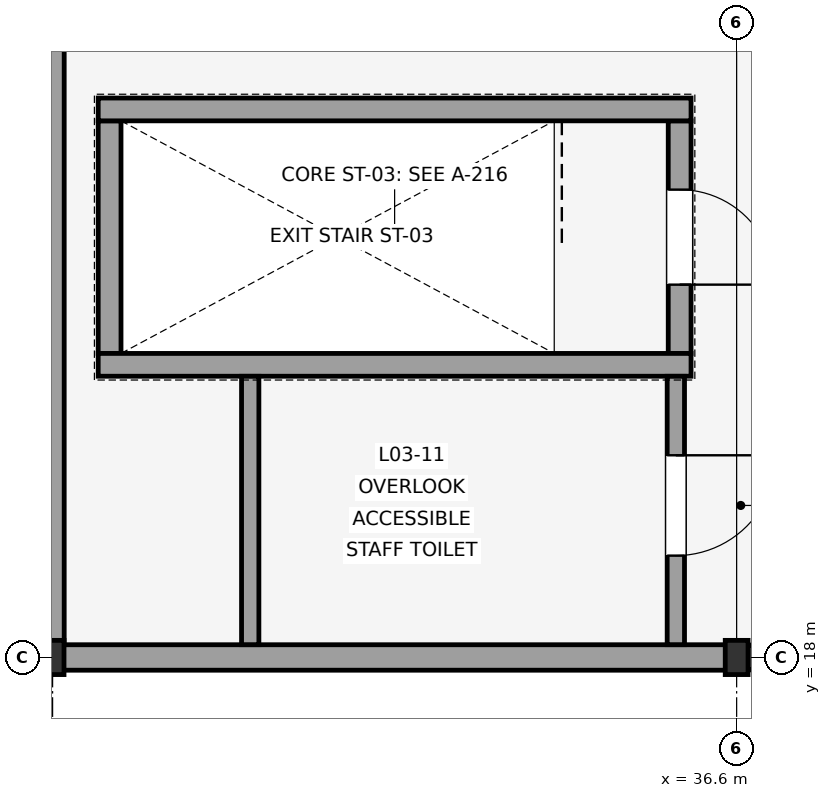
"""IFC4 building model, lengths in metres.
Left out: names, types, materials, properties, quantities, classifications, styles, units other than length and angle.
Written with IfcOpenShell. Run it as: python <this file> out.ifc"""

import sys

from ifc_helpers import new_model, si_unit, direction, frame, frame_2d, origin, origin_2d, place, context, subcontext, project, spatial, rectangle, i_section, extrude, element, fill, save


model = new_model("IFC4")
c1 = context("Model", 3, precision=1e-05, world=origin(), true_north=direction((0.0, 1.0)))
c2 = subcontext(c1, "Body", "Model", "MODEL_VIEW")
j1 = project(units=[si_unit("LENGTHUNIT", "METRE"), si_unit("PLANEANGLEUNIT", "RADIAN")], contexts=[c1])
p1 = place(None, origin())
s1 = spatial("IfcSite", under=j1, at=p1, CompositionType="ELEMENT")
p2 = place(p1, origin())
s2 = spatial("IfcBuilding", under=s1, at=p2, CompositionType="ELEMENT")
p3 = place(p2, frame((0.0, 0.0, 13.8)))
s3 = spatial("IfcBuildingStorey", under=s2, at=p3, CompositionType="ELEMENT", Elevation=13.8)
for number, where, z_axis, x_axis in (
    (1, (27.6, 18.0, 0.0), (0.0, 0.0, 1.0), (1.0, 0.0, 0.0)),
    (2, (36.6, 18.0, 0.0), (0.0, 0.0, 1.0), (1.0, 0.0, 0.0)),
):
    element("IfcColumn", number, at=place(p3, frame(where, z_axis=z_axis, x_axis=x_axis)), inside=s3, PredefinedType="COLUMN", context=c2, shape_type="SweptSolid", body=[
        extrude(i_section(OverallWidth=0.3, OverallDepth=0.45, WebThickness=0.014, FlangeThickness=0.026, FilletRadius=0.027, at=origin_2d()), origin(), (0.0, 0.0, 1.0), 4.5),
    ])
p4 = place(p3, frame((27.45, 18.0, 0.0), z_axis=(0.0, 0.0, 1.0), x_axis=(1.0, 0.0, 0.0)))
e3 = element("IfcWall", 3, at=p4, inside=s3, PredefinedType="SOLIDWALL", context=c2, shape_type="SweptSolid", body=[
    extrude(rectangle(XDim=9.3, YDim=0.335, at=frame_2d((4.65, 0.0))), origin(), (0.0, 0.0, 1.0), 2.55),
])
p5 = place(p3, frame((36.751, 18.0, 0.0), z_axis=(0.0, 0.0, 1.0), x_axis=(1.0, 0.0, 0.0)))
e4 = element("IfcWall", 4, at=p5, inside=s3, PredefinedType="SOLIDWALL", context=c2, shape_type="SweptSolid", body=[
    extrude(rectangle(XDim=8.999, YDim=0.32, at=frame_2d((4.5, 0.0))), origin(), (0.0, 0.0, 1.0), 2.55),
])
p6 = place(p3, frame((27.6, 26.0, 0.0), z_axis=(0.0, 0.0, 1.0), x_axis=(0.0, -1.0, 0.0)))
e5 = element("IfcWall", 5, at=p6, inside=s3, PredefinedType="SOLIDWALL", context=c2, shape_type="SweptSolid", body=[
    extrude(rectangle(XDim=7.832, YDim=0.305, at=frame_2d((3.916, 0.0))), origin(), (0.0, 0.0, 1.0), 2.55),
])
p7 = place(p3, frame((35.85, 25.06, 0.0), z_axis=(0.0, 0.0, 1.0), x_axis=(0.0, -1.0, 0.0)))
e6 = element("IfcWall", 6, at=p7, inside=s3, PredefinedType="SHEAR", context=c2, shape_type="SweptSolid", body=[
    extrude(rectangle(XDim=3.06, YDim=0.3, at=frame_2d((1.53, 0.0))), origin(), (0.0, 0.0, 1.0), 4.5),
])
p8 = place(p7, frame((0.905, 0.0, 0.0)))
e7 = element("IfcOpeningElement", 7, at=p8, cuts=e6, PredefinedType="OPENING", context=c2, shape_type="SweptSolid", body=[
    extrude(rectangle(XDim=1.25, YDim=2.15, at=frame_2d((0.625, 1.075))), frame((0.0, 0.16, 0.0), z_axis=(0.0, -1.0, 0.0), x_axis=(1.0, 0.0, 0.0)), (0.0, 0.0, 1.0), 0.32),
])
p9 = place(p3, frame((28.35, 25.06, 0.0), z_axis=(0.0, 0.0, 1.0), x_axis=(0.0, -1.0, 0.0)))
e8 = element("IfcWall", 8, at=p9, inside=s3, PredefinedType="SHEAR", context=c2, shape_type="SweptSolid", body=[
    extrude(rectangle(XDim=3.06, YDim=0.3, at=frame_2d((1.53, 0.0))), origin(), (0.0, 0.0, 1.0), 4.5),
])
for number, where, z_axis, x_axis in (
    (9, (36.0, 25.21, 0.0), (0.0, 0.0, 1.0), (-1.0, 0.0, 0.0)),
    (10, (36.0, 21.85, 0.0), (0.0, 0.0, 1.0), (-1.0, 0.0, 0.0)),
):
    element("IfcWall", number, at=place(p3, frame(where, z_axis=z_axis, x_axis=x_axis)), inside=s3, PredefinedType="SHEAR", context=c2, shape_type="SweptSolid", body=[
        extrude(rectangle(XDim=7.8, YDim=0.3, at=frame_2d((3.9, 0.0))), origin(), (0.0, 0.0, 1.0), 4.5),
    ])
p10 = place(p3, frame((30.2, 18.168, 0.0), z_axis=(0.0, 0.0, 1.0), x_axis=(0.0, 1.0, 0.0)))
e11 = element("IfcWall", 11, at=p10, inside=s3, PredefinedType="PLUMBINGWALL", context=c2, shape_type="SweptSolid", body=[
    extrude(rectangle(XDim=3.531, YDim=0.228, at=frame_2d((1.765, 0.0))), origin(), (0.0, 0.0, 1.0), 2.7),
])
p11 = place(p3, frame((35.8, 21.699, 0.0), z_axis=(0.0, 0.0, 1.0), x_axis=(0.0, -1.0, 0.0)))
e12 = element("IfcWall", 12, at=p11, inside=s3, PredefinedType="PLUMBINGWALL", context=c2, shape_type="SweptSolid", body=[
    extrude(rectangle(XDim=3.531, YDim=0.228, at=frame_2d((1.765, 0.0))), origin(), (0.0, 0.0, 1.0), 2.7),
])
p12 = place(p11, frame((1.039, 0.0, 0.0)))
e13 = element("IfcOpeningElement", 13, at=p12, cuts=e12, PredefinedType="OPENING", context=c2, shape_type="SweptSolid", body=[
    extrude(rectangle(XDim=1.32, YDim=2.2, at=frame_2d((0.66, 1.1))), frame((0.0, 0.124, 0.0), z_axis=(0.0, -1.0, 0.0), x_axis=(1.0, 0.0, 0.0)), (0.0, 0.0, 1.0), 0.248),
])
p13 = place(p8, origin())
e14 = element("IfcDoor", 14, at=p13, inside=s3, OperationType="SINGLE_SWING_RIGHT", PredefinedType="DOOR", context=c2, shape_type="SweptSolid", body=[
    extrude(rectangle(XDim=1.25, YDim=2.15, at=frame_2d((0.625, 1.075))), frame((0.0, 0.025, 0.0), z_axis=(0.0, -1.0, 0.0), x_axis=(1.0, 0.0, 0.0)), (0.0, 0.0, 1.0), 0.05),
])
fill(e7, e14)
p14 = place(p12, origin())
e15 = element("IfcDoor", 15, at=p14, inside=s3, OperationType="SINGLE_SWING_LEFT", PredefinedType="DOOR", context=c2, shape_type="SweptSolid", body=[
    extrude(rectangle(XDim=1.32, YDim=2.2, at=frame_2d((0.66, 1.1))), frame((0.0, 0.025, 0.0), z_axis=(0.0, -1.0, 0.0), x_axis=(1.0, 0.0, 0.0)), (0.0, 0.0, 1.0), 0.05),
])
fill(e13, e15)
save(model, sys.argv[1])
